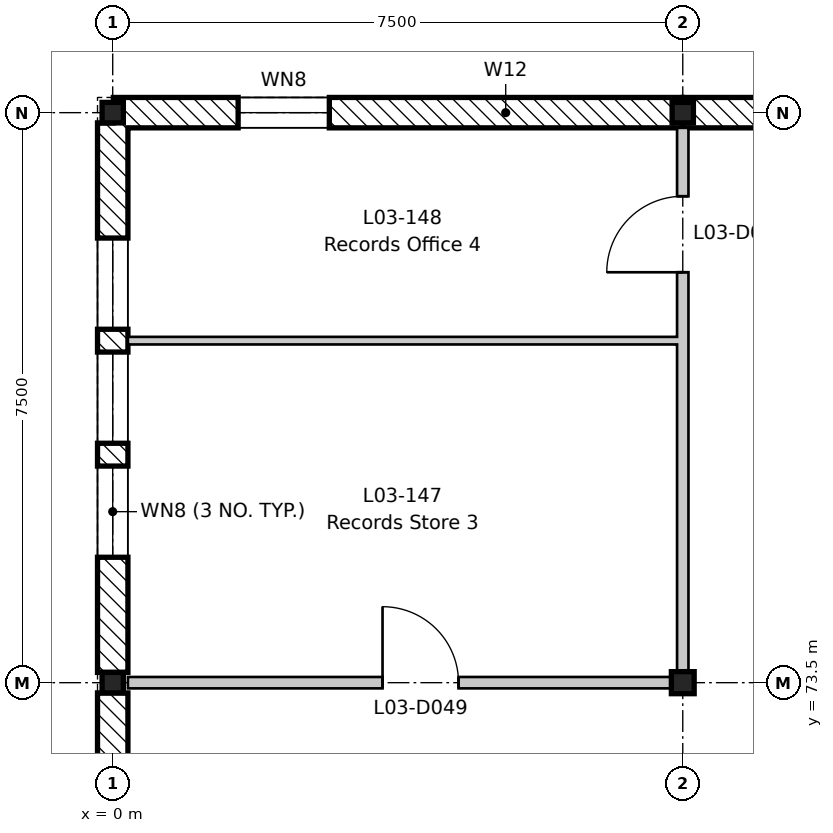
"""IFC4 building model, lengths in metres.
Left out: names, types, materials, properties, quantities, classifications, styles, units other than length and angle.
Written with IfcOpenShell. Run it as: python <this file> out.ifc"""

import sys

from ifc_helpers import new_model, si_unit, direction, frame, frame_2d, origin, origin_2d, place, context, subcontext, project, spatial, rectangle, i_section, extrude, element, fill, save


model = new_model("IFC4")
c1 = context("Model", 3, precision=1e-05, world=origin(), true_north=direction((0.0, 1.0)))
c2 = subcontext(c1, "Body", "Model", "MODEL_VIEW")
j1 = project(units=[si_unit("LENGTHUNIT", "METRE"), si_unit("PLANEANGLEUNIT", "RADIAN")], contexts=[c1])
p1 = place(None, origin())
s1 = spatial("IfcSite", under=j1, at=p1, CompositionType="ELEMENT")
p2 = place(p1, origin())
s2 = spatial("IfcBuilding", under=s1, at=p2, CompositionType="ELEMENT")
p3 = place(p2, frame((0.0, 0.0, 14.4)))
s3 = spatial("IfcBuildingStorey", under=s2, at=p3, CompositionType="ELEMENT", Elevation=14.4)
for number, where, z_axis, x_axis in (
    (1, (0.0, 73.5, -0.2), (0.0, 0.0, 1.0), (1.0, 0.0, 0.0)),
    (2, (0.0, 81.0, -0.2), (0.0, 0.0, 1.0), (1.0, 0.0, 0.0)),
):
    element("IfcColumn", number, at=place(p3, frame(where, z_axis=z_axis, x_axis=x_axis)), inside=s3, PredefinedType="COLUMN", context=c2, shape_type="SweptSolid", body=[
        extrude(i_section(OverallWidth=0.28, OverallDepth=0.27, WebThickness=0.008, FlangeThickness=0.013, FilletRadius=0.024, at=origin_2d()), origin(), (0.0, 0.0, 1.0), 4.2),
    ])
p4 = place(p3, frame((7.5, 73.5, -0.2), z_axis=(0.0, 0.0, 1.0), x_axis=(1.0, 0.0, 0.0)))
e3 = element("IfcColumn", 3, at=p4, inside=s3, PredefinedType="COLUMN", context=c2, shape_type="SweptSolid", body=[
    extrude(i_section(OverallWidth=0.3, OverallDepth=0.29, WebThickness=0.009, FlangeThickness=0.014, FilletRadius=0.027, at=origin_2d()), origin(), (0.0, 0.0, 1.0), 4.2),
])
p5 = place(p3, frame((7.5, 81.0, -0.2), z_axis=(0.0, 0.0, 1.0), x_axis=(1.0, 0.0, 0.0)))
e4 = element("IfcColumn", 4, at=p5, inside=s3, PredefinedType="COLUMN", context=c2, shape_type="SweptSolid", body=[
    extrude(i_section(OverallWidth=0.28, OverallDepth=0.27, WebThickness=0.008, FlangeThickness=0.013, FilletRadius=0.024, at=origin_2d()), origin(), (0.0, 0.0, 1.0), 4.2),
])
p6 = place(p3, frame((0.0, 70.635, 0.0), z_axis=(0.0, 0.0, 1.0), x_axis=(0.0, 1.0, 0.0)))
e5 = element("IfcWall", 5, at=p6, inside=s3, PredefinedType="STANDARD", context=c2, shape_type="SweptSolid", body=[
    extrude(rectangle(XDim=2.73, YDim=0.4, at=frame_2d((1.365, 0.0))), origin(), (0.0, 0.0, 1.0), 3.73),
])
p7 = place(p3, frame((0.0, 73.635, 0.0), z_axis=(0.0, 0.0, 1.0), x_axis=(0.0, 1.0, 0.0)))
e6 = element("IfcWall", 6, at=p7, inside=s3, PredefinedType="STANDARD", context=c2, shape_type="SweptSolid", body=[
    extrude(rectangle(XDim=7.23, YDim=0.4, at=frame_2d((3.615, 0.0))), origin(), (0.0, 0.0, 1.0), 3.6),
])
p8 = place(p7, frame((1.515, 0.0, 0.6)))
e7 = element("IfcOpeningElement", 7, at=p8, cuts=e6, PredefinedType="OPENING", context=c2, shape_type="SweptSolid", body=[
    extrude(rectangle(XDim=1.2, YDim=2.7, at=frame_2d((0.6, 1.35))), frame((0.0, 0.21, 0.0), z_axis=(0.0, -1.0, 0.0), x_axis=(1.0, 0.0, 0.0)), (0.0, 0.0, 1.0), 0.42),
])
p9 = place(p7, frame((3.015, 0.0, 0.6)))
e8 = element("IfcOpeningElement", 8, at=p9, cuts=e6, PredefinedType="OPENING", context=c2, shape_type="SweptSolid", body=[
    extrude(rectangle(XDim=1.2, YDim=2.7, at=frame_2d((0.6, 1.35))), frame((0.0, 0.21, 0.0), z_axis=(0.0, -1.0, 0.0), x_axis=(1.0, 0.0, 0.0)), (0.0, 0.0, 1.0), 0.42),
])
p10 = place(p7, frame((4.515, 0.0, 0.6)))
e9 = element("IfcOpeningElement", 9, at=p10, cuts=e6, PredefinedType="OPENING", context=c2, shape_type="SweptSolid", body=[
    extrude(rectangle(XDim=1.2, YDim=2.7, at=frame_2d((0.6, 1.35))), frame((0.0, 0.21, 0.0), z_axis=(0.0, -1.0, 0.0), x_axis=(1.0, 0.0, 0.0)), (0.0, 0.0, 1.0), 0.42),
])
p11 = place(p3, frame((0.009, 81.0, 0.0), z_axis=(0.0, 0.0, 1.0), x_axis=(1.0, 0.0, 0.0)))
e10 = element("IfcWall", 10, at=p11, inside=s3, PredefinedType="STANDARD", context=c2, shape_type="SweptSolid", body=[
    extrude(rectangle(XDim=7.482, YDim=0.4, at=frame_2d((3.741, 0.0))), origin(), (0.0, 0.0, 1.0), 3.67),
])
p12 = place(p11, frame((1.641, 0.0, 0.6)))
e11 = element("IfcOpeningElement", 11, at=p12, cuts=e10, PredefinedType="OPENING", context=c2, shape_type="SweptSolid", body=[
    extrude(rectangle(XDim=1.2, YDim=2.7, at=frame_2d((0.6, 1.35))), frame((0.0, 0.21, 0.0), z_axis=(0.0, -1.0, 0.0), x_axis=(1.0, 0.0, 0.0)), (0.0, 0.0, 1.0), 0.42),
])
p13 = place(p3, frame((7.509, 81.0, 0.0), z_axis=(0.0, 0.0, 1.0), x_axis=(1.0, 0.0, 0.0)))
e12 = element("IfcWall", 12, at=p13, inside=s3, PredefinedType="STANDARD", context=c2, shape_type="SweptSolid", body=[
    extrude(rectangle(XDim=2.982, YDim=0.4, at=frame_2d((1.491, 0.0))), origin(), (0.0, 0.0, 1.0), 3.8),
])
p14 = place(p3, frame((7.5, 73.5, 0.0), z_axis=(0.0, 0.0, 1.0), x_axis=(0.0, 1.0, 0.0)))
e13 = element("IfcWall", 13, at=p14, inside=s3, PredefinedType="PARTITIONING", context=c2, shape_type="SweptSolid", body=[
    extrude(rectangle(XDim=7.3, YDim=0.15, at=frame_2d((3.65, 0.0))), origin(), (0.0, 0.0, 1.0), 3.48),
])
p15 = place(p14, frame((5.4, 0.0, 0.0)))
e14 = element("IfcOpeningElement", 14, at=p15, cuts=e13, PredefinedType="OPENING", context=c2, shape_type="SweptSolid", body=[
    extrude(rectangle(XDim=1.0, YDim=2.1, at=frame_2d((0.5, 1.05))), frame((0.0, 0.085, 0.0), z_axis=(0.0, -1.0, 0.0), x_axis=(1.0, 0.0, 0.0)), (0.0, 0.0, 1.0), 0.17),
])
p16 = place(p3, frame((0.2, 73.5, 0.0), z_axis=(0.0, 0.0, 1.0), x_axis=(1.0, 0.0, 0.0)))
e15 = element("IfcWall", 15, at=p16, inside=s3, PredefinedType="PARTITIONING", context=c2, shape_type="SweptSolid", body=[
    extrude(rectangle(XDim=7.225, YDim=0.15, at=frame_2d((3.613, 0.0))), origin(), (0.0, 0.0, 1.0), 3.65),
])
p17 = place(p16, frame((3.35, 0.0, 0.0)))
e16 = element("IfcOpeningElement", 16, at=p17, cuts=e15, PredefinedType="OPENING", context=c2, shape_type="SweptSolid", body=[
    extrude(rectangle(XDim=1.0, YDim=2.1, at=frame_2d((0.5, 1.05))), frame((0.0, 0.085, 0.0), z_axis=(0.0, -1.0, 0.0), x_axis=(1.0, 0.0, 0.0)), (0.0, 0.0, 1.0), 0.17),
])
p18 = place(p3, frame((0.2, 78.0, 0.0), z_axis=(0.0, 0.0, 1.0), x_axis=(1.0, 0.0, 0.0)))
e17 = element("IfcWall", 17, at=p18, inside=s3, PredefinedType="PARTITIONING", context=c2, shape_type="SweptSolid", body=[
    extrude(rectangle(XDim=7.225, YDim=0.1, at=frame_2d((3.613, 0.0))), origin(), (0.0, 0.0, 1.0), 4.0),
])
p19 = place(p8, origin())
e18 = element("IfcWindow", 18, at=p19, inside=s3, PartitioningType="SINGLE_PANEL", PredefinedType="WINDOW", context=c2, shape_type="SweptSolid", body=[
    extrude(rectangle(XDim=1.2, YDim=2.7, at=frame_2d((0.6, 1.35))), frame((0.0, 0.03, 0.0), z_axis=(0.0, -1.0, 0.0), x_axis=(1.0, 0.0, 0.0)), (0.0, 0.0, 1.0), 0.06),
])
fill(e7, e18)
p20 = place(p9, origin())
e19 = element("IfcWindow", 19, at=p20, inside=s3, PartitioningType="SINGLE_PANEL", PredefinedType="WINDOW", context=c2, shape_type="SweptSolid", body=[
    extrude(rectangle(XDim=1.2, YDim=2.7, at=frame_2d((0.6, 1.35))), frame((0.0, 0.03, 0.0), z_axis=(0.0, -1.0, 0.0), x_axis=(1.0, 0.0, 0.0)), (0.0, 0.0, 1.0), 0.06),
])
fill(e8, e19)
p21 = place(p10, origin())
e20 = element("IfcWindow", 20, at=p21, inside=s3, PartitioningType="SINGLE_PANEL", PredefinedType="WINDOW", context=c2, shape_type="SweptSolid", body=[
    extrude(rectangle(XDim=1.2, YDim=2.7, at=frame_2d((0.6, 1.35))), frame((0.0, 0.03, 0.0), z_axis=(0.0, -1.0, 0.0), x_axis=(1.0, 0.0, 0.0)), (0.0, 0.0, 1.0), 0.06),
])
fill(e9, e20)
p22 = place(p12, origin())
e21 = element("IfcWindow", 21, at=p22, inside=s3, PartitioningType="SINGLE_PANEL", PredefinedType="WINDOW", context=c2, shape_type="SweptSolid", body=[
    extrude(rectangle(XDim=1.2, YDim=2.7, at=frame_2d((0.6, 1.35))), frame((0.0, 0.03, 0.0), z_axis=(0.0, -1.0, 0.0), x_axis=(1.0, 0.0, 0.0)), (0.0, 0.0, 1.0), 0.06),
])
fill(e11, e21)
p23 = place(p17, origin())
e22 = element("IfcDoor", 22, at=p23, inside=s3, OperationType="SINGLE_SWING_LEFT", PredefinedType="DOOR", context=c2, shape_type="SweptSolid", body=[
    extrude(rectangle(XDim=1.0, YDim=2.1, at=frame_2d((0.5, 1.05))), frame((0.0, 0.025, 0.0), z_axis=(0.0, -1.0, 0.0), x_axis=(1.0, 0.0, 0.0)), (0.0, 0.0, 1.0), 0.05),
])
fill(e16, e22)
p24 = place(p15, origin())
e23 = element("IfcDoor", 23, at=p24, inside=s3, OperationType="SINGLE_SWING_LEFT", PredefinedType="DOOR", context=c2, shape_type="SweptSolid", body=[
    extrude(rectangle(XDim=1.0, YDim=2.1, at=frame_2d((0.5, 1.05))), frame((0.0, 0.025, 0.0), z_axis=(0.0, -1.0, 0.0), x_axis=(1.0, 0.0, 0.0)), (0.0, 0.0, 1.0), 0.05),
])
fill(e14, e23)
save(model, sys.argv[1])
